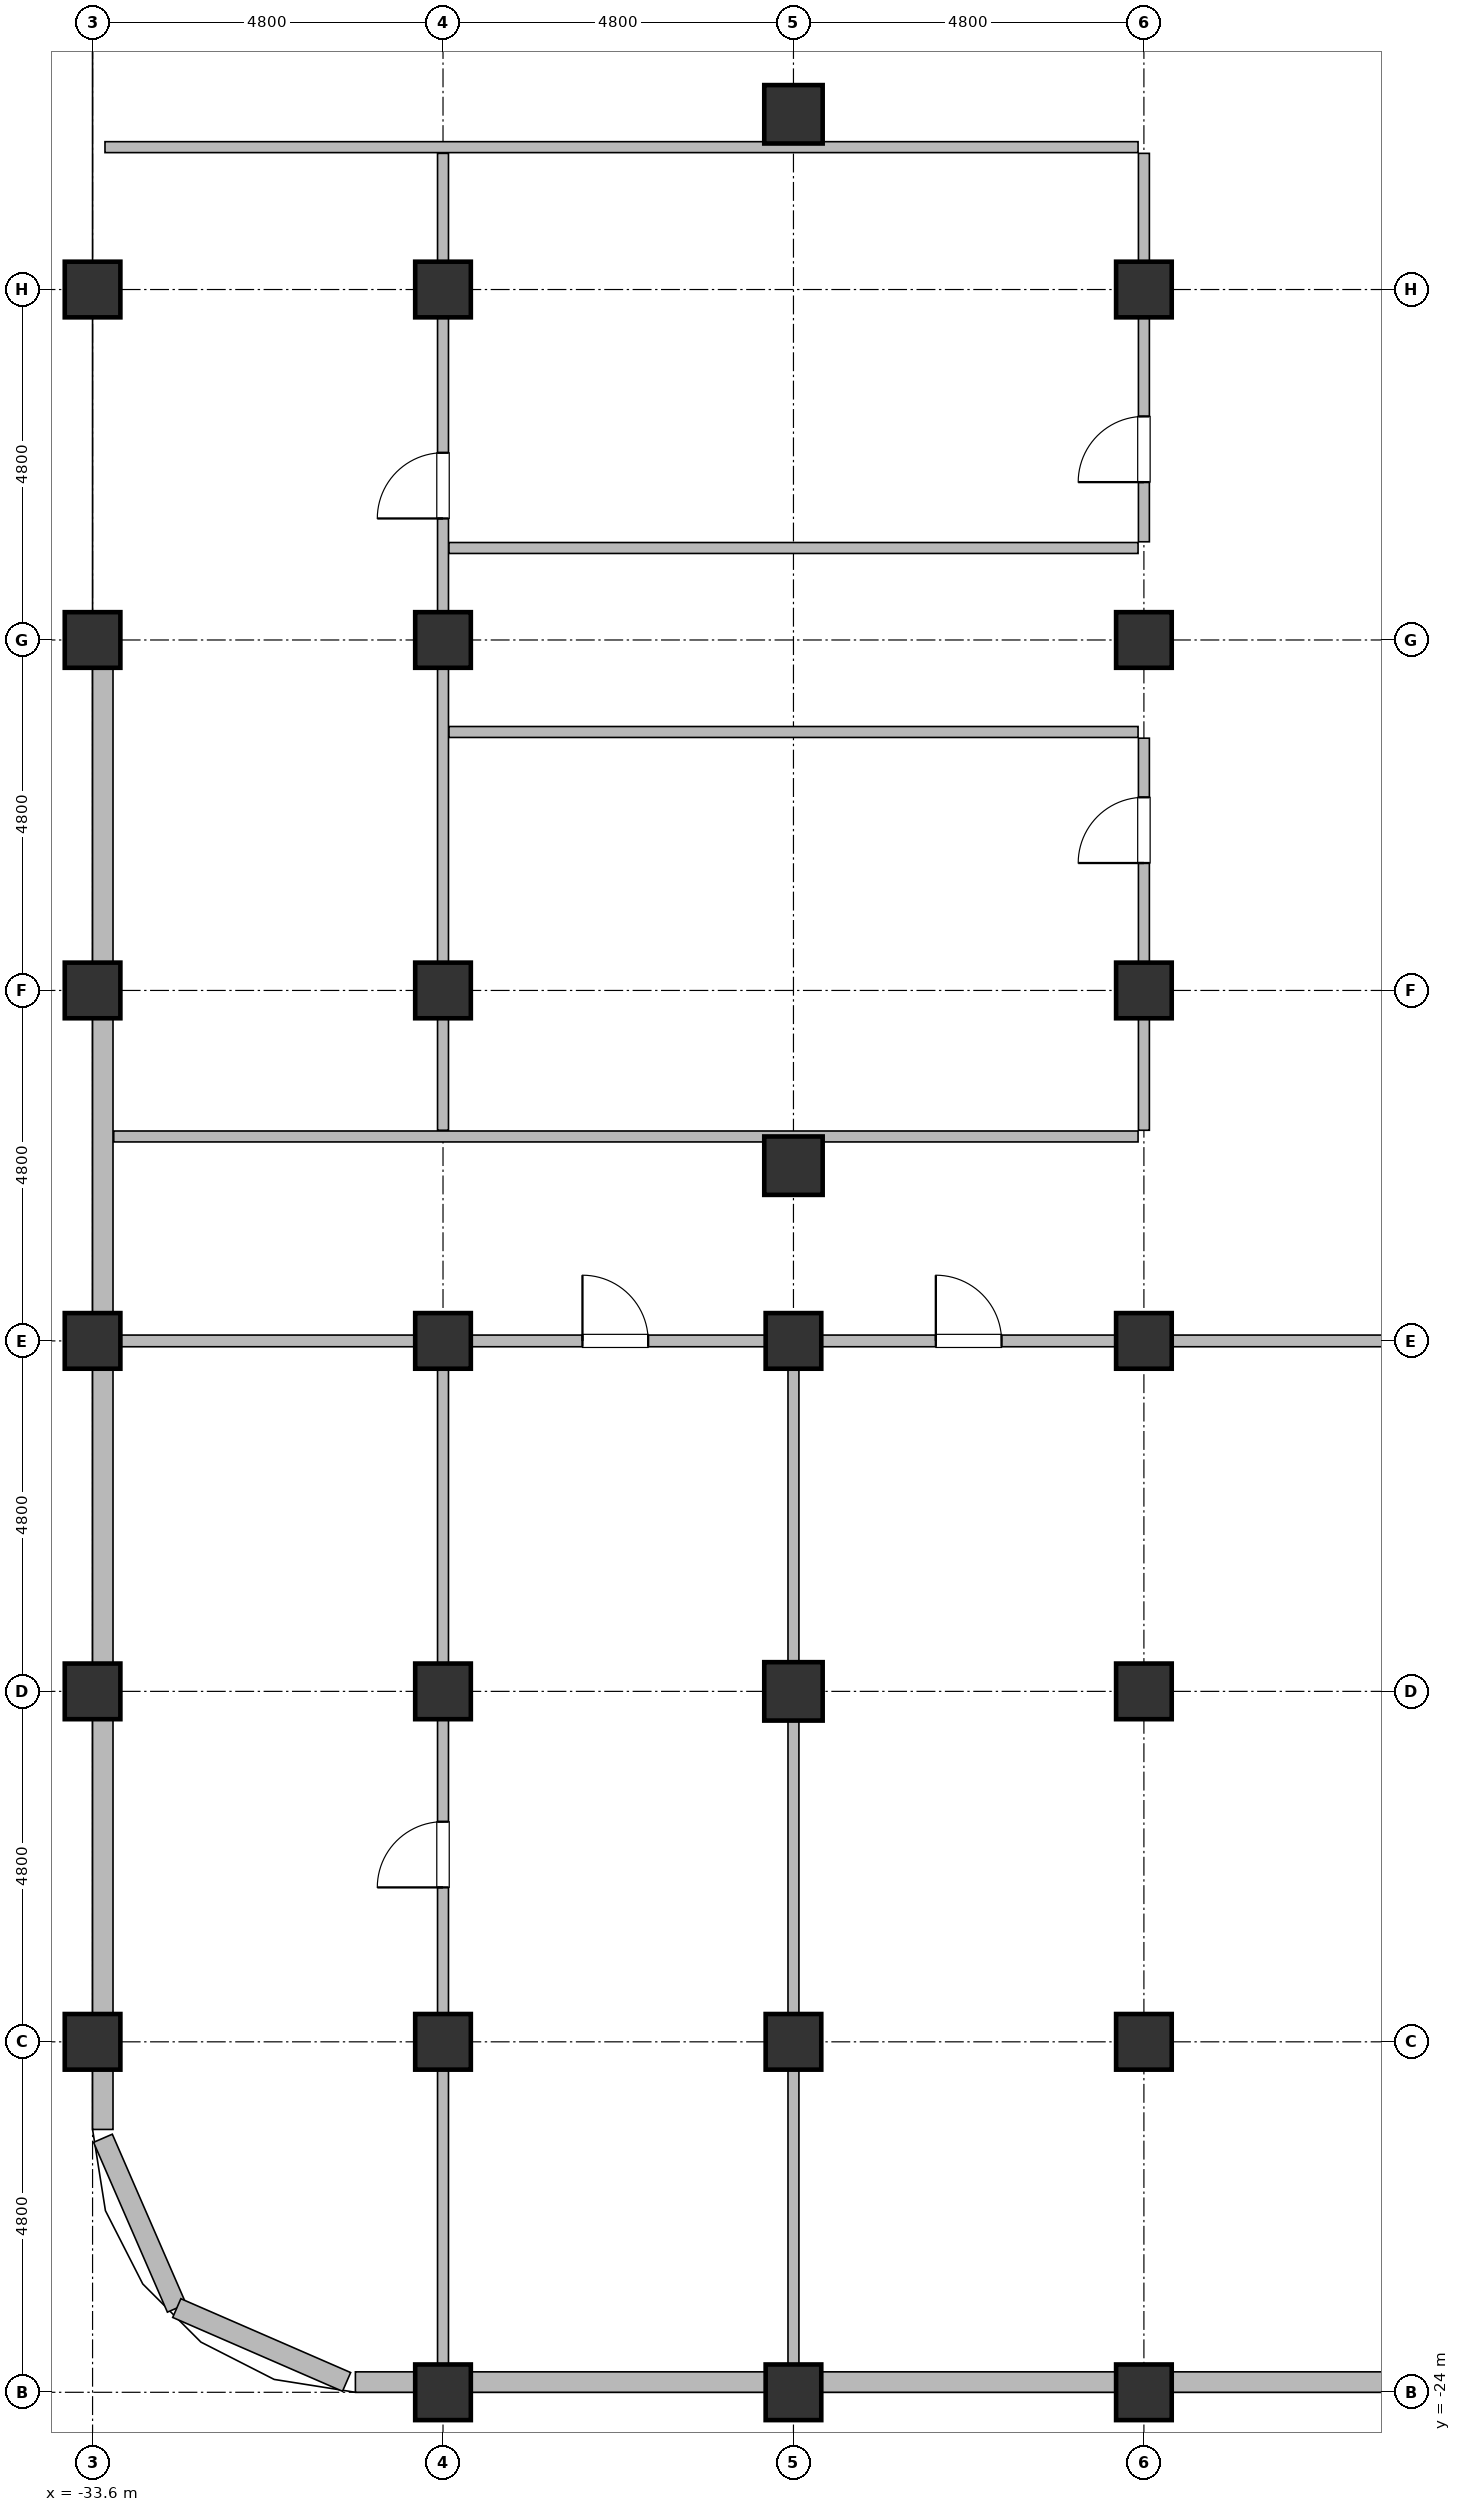
"""IFC4 building model, lengths in metres.
Left out: names, types, materials, properties, quantities, classifications, styles, units other than length and angle.
Written with IfcOpenShell. Run it as: python <this file> out.ifc"""

import sys

from ifc_helpers import new_model, si_unit, direction, frame, frame_2d, origin, origin_2d, place, context, subcontext, project, spatial, rectangle, hollow_rectangle, hollow_circle, extrude, element, fill, save


model = new_model("IFC4")
c1 = context("Model", 3, precision=1e-05, world=origin(), true_north=direction((0.0, 1.0)))
c2 = subcontext(c1, "Body", "Model", "MODEL_VIEW")
j1 = project(units=[si_unit("LENGTHUNIT", "METRE"), si_unit("PLANEANGLEUNIT", "RADIAN")], contexts=[c1])
p1 = place(None, origin())
s1 = spatial("IfcSite", under=j1, at=p1, CompositionType="ELEMENT")
p2 = place(p1, origin())
s2 = spatial("IfcBuilding", under=s1, at=p2, CompositionType="ELEMENT")
p3 = place(p2, frame((0.0, 0.0, 48.5)))
s3 = spatial("IfcBuildingStorey", under=s2, at=p3, CompositionType="ELEMENT", Elevation=48.5)
for number, where, z_axis, x_axis in (
    (1, (-33.6, -19.2, 0.0), (0.0, 0.0, 1.0), (1.0, 0.0, 0.0)),
    (2, (-33.6, -14.4, 0.0), (0.0, 0.0, 1.0), (1.0, 0.0, 0.0)),
    (3, (-33.6, -9.6, 0.0), (0.0, 0.0, 1.0), (1.0, 0.0, 0.0)),
    (4, (-33.6, -4.8, 0.0), (0.0, 0.0, 1.0), (1.0, 0.0, 0.0)),
    (5, (-33.6, 0.0, 0.0), (0.0, 0.0, 1.0), (1.0, 0.0, 0.0)),
    (6, (-33.6, 4.8, 0.0), (0.0, 0.0, 1.0), (1.0, 0.0, 0.0)),
    (7, (-28.8, -24.0, 0.0), (0.0, 0.0, 1.0), (1.0, 0.0, 0.0)),
    (8, (-28.8, -19.2, 0.0), (0.0, 0.0, 1.0), (1.0, 0.0, 0.0)),
    (9, (-28.8, -14.4, 0.0), (0.0, 0.0, 1.0), (1.0, 0.0, 0.0)),
    (10, (-28.8, -9.6, 0.0), (0.0, 0.0, 1.0), (1.0, 0.0, 0.0)),
    (11, (-28.8, -4.8, 0.0), (0.0, 0.0, 1.0), (1.0, 0.0, 0.0)),
    (12, (-28.8, 0.0, 0.0), (0.0, 0.0, 1.0), (1.0, 0.0, 0.0)),
    (13, (-28.8, 4.8, 0.0), (0.0, 0.0, 1.0), (1.0, 0.0, 0.0)),
    (14, (-24.0, -24.0, 0.0), (0.0, 0.0, 1.0), (1.0, 0.0, 0.0)),
    (15, (-24.0, -19.2, 0.0), (0.0, 0.0, 1.0), (1.0, 0.0, 0.0)),
):
    element("IfcColumn", number, at=place(p3, frame(where, z_axis=z_axis, x_axis=x_axis)), inside=s3, PredefinedType="COLUMN", context=c2, shape_type="SweptSolid", body=[
        extrude(hollow_circle(Radius=0.381, WallThickness=0.032, at=origin_2d()), origin(), (0.0, 0.0, 1.0), 3.7),
    ])
p4 = place(p3, frame((-24.0, -14.4, 0.0), z_axis=(0.0, 0.0, 1.0), x_axis=(1.0, 0.0, 0.0)))
e16 = element("IfcColumn", 16, at=p4, inside=s3, PredefinedType="COLUMN", context=c2, shape_type="SweptSolid", body=[
    extrude(hollow_rectangle(XDim=0.8, YDim=0.8, WallThickness=0.036, at=origin_2d()), origin(), (0.0, 0.0, 1.0), 3.7),
])
p5 = place(p3, frame((-24.0, -9.6, 0.0), z_axis=(0.0, 0.0, 1.0), x_axis=(1.0, 0.0, 0.0)))
e17 = element("IfcColumn", 17, at=p5, inside=s3, PredefinedType="COLUMN", context=c2, shape_type="SweptSolid", body=[
    extrude(hollow_circle(Radius=0.381, WallThickness=0.032, at=origin_2d()), origin(), (0.0, 0.0, 1.0), 3.7),
])
for number, where, z_axis, x_axis in (
    (18, (-24.0, -7.2, 0.0), (0.0, 0.0, 1.0), (1.0, 0.0, 0.0)),
    (19, (-24.0, 7.2, 0.0), (0.0, 0.0, 1.0), (1.0, 0.0, 0.0)),
):
    element("IfcColumn", number, at=place(p3, frame(where, z_axis=z_axis, x_axis=x_axis)), inside=s3, PredefinedType="COLUMN", context=c2, shape_type="SweptSolid", body=[
        extrude(hollow_rectangle(XDim=0.8, YDim=0.8, WallThickness=0.036, at=origin_2d()), origin(), (0.0, 0.0, 1.0), 3.7),
    ])
for number, where, z_axis, x_axis in (
    (20, (-19.2, -24.0, 0.0), (0.0, 0.0, 1.0), (1.0, 0.0, 0.0)),
    (21, (-19.2, -19.2, 0.0), (0.0, 0.0, 1.0), (1.0, 0.0, 0.0)),
    (22, (-19.2, -14.4, 0.0), (0.0, 0.0, 1.0), (1.0, 0.0, 0.0)),
    (23, (-19.2, -9.6, 0.0), (0.0, 0.0, 1.0), (1.0, 0.0, 0.0)),
    (24, (-19.2, -4.8, 0.0), (0.0, 0.0, 1.0), (1.0, 0.0, 0.0)),
    (25, (-19.2, 0.0, 0.0), (0.0, 0.0, 1.0), (1.0, 0.0, 0.0)),
    (26, (-19.2, 4.8, 0.0), (0.0, 0.0, 1.0), (1.0, 0.0, 0.0)),
):
    element("IfcColumn", number, at=place(p3, frame(where, z_axis=z_axis, x_axis=x_axis)), inside=s3, PredefinedType="COLUMN", context=c2, shape_type="SweptSolid", body=[
        extrude(hollow_circle(Radius=0.381, WallThickness=0.032, at=origin_2d()), origin(), (0.0, 0.0, 1.0), 3.7),
    ])
p6 = place(p3, frame((-33.458, -20.521, 0.0), z_axis=(0.0, 0.0, 1.0), x_axis=(0.398792985289, -0.917040977756, 0.0)))
e27 = element("IfcWall", 27, at=p6, inside=s3, PredefinedType="SOLIDWALL", context=c2, shape_type="SweptSolid", body=[
    extrude(rectangle(XDim=2.536, YDim=0.28, at=frame_2d((1.268, 0.0))), origin(), (0.0, 0.0, 1.0), 2.12),
])
p7 = place(p3, frame((-32.447, -22.847, 0.0), z_axis=(0.0, 0.0, 1.0), x_axis=(0.917060872934, -0.398747232384, 0.0)))
e28 = element("IfcWall", 28, at=p7, inside=s3, PredefinedType="SOLIDWALL", context=c2, shape_type="SweptSolid", body=[
    extrude(rectangle(XDim=2.536, YDim=0.28, at=frame_2d((1.268, 0.0))), origin(), (0.0, 0.0, 1.0), 2.12),
])
p8 = place(p3, frame((-30.0, -23.86, 0.0), z_axis=(0.0, 0.0, 1.0), x_axis=(1.0, 0.0, 0.0)))
e29 = element("IfcWall", 29, at=p8, inside=s3, PredefinedType="SOLIDWALL", context=c2, shape_type="SweptSolid", body=[
    extrude(rectangle(XDim=25.25, YDim=0.28, at=frame_2d((12.625, 0.0))), origin(), (0.0, 0.0, 1.0), 2.12),
])
p9 = place(p8, frame((11.798, 0.0, 0.75)))
e30 = element("IfcOpeningElement", 30, at=p9, cuts=e29, PredefinedType="OPENING", context=c2, shape_type="SweptSolid", body=[
    extrude(rectangle(XDim=1.8, YDim=1.15, at=frame_2d((0.9, 0.575))), frame((0.0, 0.155, 0.0), z_axis=(0.0, -1.0, 0.0), x_axis=(1.0, 0.0, 0.0)), (0.0, 0.0, 1.0), 0.31),
])
p10 = place(p3, frame((-33.46, -20.4, 0.0), z_axis=(0.0, 0.0, 1.0), x_axis=(0.0, 1.0, 0.0)))
e31 = element("IfcWall", 31, at=p10, inside=s3, PredefinedType="SOLIDWALL", context=c2, shape_type="SweptSolid", body=[
    extrude(rectangle(XDim=20.38, YDim=0.28, at=frame_2d((10.19, 0.0))), origin(), (0.0, 0.0, 1.0), 2.12),
])
p11 = place(p3, frame((-33.31, -9.6, 0.0), z_axis=(0.0, 0.0, 1.0), x_axis=(1.0, 0.0, 0.0)))
e32 = element("IfcWall", 32, at=p11, inside=s3, PredefinedType="PARTITIONING", context=c2, shape_type="SweptSolid", body=[
    extrude(rectangle(XDim=61.82, YDim=0.16, at=frame_2d((30.91, 0.0))), origin(), (0.0, 0.0, 1.0), 2.62),
])
p12 = place(p11, frame((6.42, 0.0, 0.0)))
e33 = element("IfcOpeningElement", 33, at=p12, cuts=e32, PredefinedType="OPENING", context=c2, shape_type="SweptSolid", body=[
    extrude(rectangle(XDim=0.9, YDim=2.1, at=frame_2d((0.45, 1.05))), frame((0.0, 0.095, 0.0), z_axis=(0.0, -1.0, 0.0), x_axis=(1.0, 0.0, 0.0)), (0.0, 0.0, 1.0), 0.19),
])
p13 = place(p11, frame((54.5, 0.0, 0.0)))
e34 = element("IfcOpeningElement", 34, at=p13, cuts=e32, PredefinedType="OPENING", context=c2, shape_type="SweptSolid", body=[
    extrude(rectangle(XDim=0.9, YDim=2.1, at=frame_2d((0.45, 1.05))), frame((0.0, 0.095, 0.0), z_axis=(0.0, -1.0, 0.0), x_axis=(1.0, 0.0, 0.0)), (0.0, 0.0, 1.0), 0.19),
])
p14 = place(p11, frame((11.26, 0.0, 0.0)))
e35 = element("IfcOpeningElement", 35, at=p14, cuts=e32, PredefinedType="OPENING", context=c2, shape_type="SweptSolid", body=[
    extrude(rectangle(XDim=0.9, YDim=2.1, at=frame_2d((0.45, 1.05))), frame((0.0, 0.095, 0.0), z_axis=(0.0, -1.0, 0.0), x_axis=(1.0, 0.0, 0.0)), (0.0, 0.0, 1.0), 0.19),
])
p15 = place(p11, frame((30.425, 0.0, 0.0)))
e36 = element("IfcOpeningElement", 36, at=p15, cuts=e32, PredefinedType="OPENING", context=c2, shape_type="SweptSolid", body=[
    extrude(rectangle(XDim=1.05, YDim=2.2, at=frame_2d((0.525, 1.1))), frame((0.0, 0.095, 0.0), z_axis=(0.0, -1.0, 0.0), x_axis=(1.0, 0.0, 0.0)), (0.0, 0.0, 1.0), 0.19),
])
p16 = place(p11, frame((40.62, 0.0, 0.0)))
e37 = element("IfcOpeningElement", 37, at=p16, cuts=e32, PredefinedType="OPENING", context=c2, shape_type="SweptSolid", body=[
    extrude(rectangle(XDim=0.92, YDim=2.15, at=frame_2d((0.46, 1.075))), frame((0.0, 0.095, 0.0), z_axis=(0.0, -1.0, 0.0), x_axis=(1.0, 0.0, 0.0)), (0.0, 0.0, 1.0), 0.19),
])
p17 = place(p11, frame((44.28, 0.0, 0.0)))
e38 = element("IfcOpeningElement", 38, at=p17, cuts=e32, PredefinedType="OPENING", context=c2, shape_type="SweptSolid", body=[
    extrude(rectangle(XDim=0.92, YDim=2.15, at=frame_2d((0.46, 1.075))), frame((0.0, 0.095, 0.0), z_axis=(0.0, -1.0, 0.0), x_axis=(1.0, 0.0, 0.0)), (0.0, 0.0, 1.0), 0.19),
])
p18 = place(p11, frame((50.22, 0.0, 0.0)))
e39 = element("IfcOpeningElement", 39, at=p18, cuts=e32, PredefinedType="OPENING", context=c2, shape_type="SweptSolid", body=[
    extrude(rectangle(XDim=0.92, YDim=2.15, at=frame_2d((0.46, 1.075))), frame((0.0, 0.095, 0.0), z_axis=(0.0, -1.0, 0.0), x_axis=(1.0, 0.0, 0.0)), (0.0, 0.0, 1.0), 0.19),
])
p19 = place(p3, frame((-33.31, -6.8, 0.0), z_axis=(0.0, 0.0, 1.0), x_axis=(1.0, 0.0, 0.0)))
e40 = element("IfcWall", 40, at=p19, inside=s3, PredefinedType="PARTITIONING", context=c2, shape_type="SweptSolid", body=[
    extrude(rectangle(XDim=14.03, YDim=0.15, at=frame_2d((7.015, 0.0))), origin(), (0.0, 0.0, 1.0), 2.62),
])
for number, where, z_axis, x_axis in (
    (41, (-28.72, -1.26, 0.0), (0.0, 0.0, 1.0), (1.0, 0.0, 0.0)),
    (42, (-28.72, 1.26, 0.0), (0.0, 0.0, 1.0), (1.0, 0.0, 0.0)),
):
    element("IfcWall", number, at=place(p3, frame(where, z_axis=z_axis, x_axis=x_axis)), inside=s3, PredefinedType="PARTITIONING", context=c2, shape_type="SweptSolid", body=[
        extrude(rectangle(XDim=9.44, YDim=0.15, at=frame_2d((4.72, 0.0))), origin(), (0.0, 0.0, 1.0), 2.82),
    ])
p20 = place(p3, frame((-33.43, 6.75, 0.0), z_axis=(0.0, 0.0, 1.0), x_axis=(1.0, 0.0, 0.0)))
e43 = element("IfcWall", 43, at=p20, inside=s3, PredefinedType="PARTITIONING", context=c2, shape_type="SweptSolid", body=[
    extrude(rectangle(XDim=14.15, YDim=0.15, at=frame_2d((7.075, 0.0))), origin(), (0.0, 0.0, 1.0), 2.62),
])
p21 = place(p3, frame((-28.8, -23.71, 0.0), z_axis=(0.0, 0.0, 1.0), x_axis=(0.0, 1.0, 0.0)))
e44 = element("IfcWall", 44, at=p21, inside=s3, PredefinedType="PARTITIONING", context=c2, shape_type="SweptSolid", body=[
    extrude(rectangle(XDim=13.99, YDim=0.15, at=frame_2d((6.995, 0.0))), origin(), (0.0, 0.0, 1.0), 2.12),
])
p22 = place(p21, frame((6.625, 0.0, 0.0)))
e45 = element("IfcOpeningElement", 45, at=p22, cuts=e44, PredefinedType="OPENING", context=c2, shape_type="SweptSolid", body=[
    extrude(rectangle(XDim=0.9, YDim=2.02, at=frame_2d((0.45, 1.01))), frame((0.0, 0.09, 0.0), z_axis=(0.0, -1.0, 0.0), x_axis=(1.0, 0.0, 0.0)), (0.0, 0.0, 1.0), 0.18),
])
p23 = place(p3, frame((-28.8, -6.715, 0.0), z_axis=(0.0, 0.0, 1.0), x_axis=(0.0, 1.0, 0.0)))
e46 = element("IfcWall", 46, at=p23, inside=s3, PredefinedType="PARTITIONING", context=c2, shape_type="SweptSolid", body=[
    extrude(rectangle(XDim=13.38, YDim=0.15, at=frame_2d((6.69, 0.0))), origin(), (0.0, 0.0, 1.0), 2.82),
])
p24 = place(p23, frame((8.379, 0.0, 0.0)))
e47 = element("IfcOpeningElement", 47, at=p24, cuts=e46, PredefinedType="OPENING", context=c2, shape_type="SweptSolid", body=[
    extrude(rectangle(XDim=0.9, YDim=2.1, at=frame_2d((0.45, 1.05))), frame((0.0, 0.09, 0.0), z_axis=(0.0, -1.0, 0.0), x_axis=(1.0, 0.0, 0.0)), (0.0, 0.0, 1.0), 0.18),
])
p25 = place(p3, frame((-24.0, -23.71, 0.0), z_axis=(0.0, 0.0, 1.0), x_axis=(0.0, 1.0, 0.0)))
e48 = element("IfcWall", 48, at=p25, inside=s3, PredefinedType="PARTITIONING", context=c2, shape_type="SweptSolid", body=[
    extrude(rectangle(XDim=13.99, YDim=0.15, at=frame_2d((6.995, 0.0))), origin(), (0.0, 0.0, 1.0), 2.62),
])
p26 = place(p3, frame((-19.2, -6.715, 0.0), z_axis=(0.0, 0.0, 1.0), x_axis=(0.0, 1.0, 0.0)))
e49 = element("IfcWall", 49, at=p26, inside=s3, PredefinedType="PARTITIONING", context=c2, shape_type="SweptSolid", body=[
    extrude(rectangle(XDim=5.37, YDim=0.15, at=frame_2d((2.685, 0.0))), origin(), (0.0, 0.0, 1.0), 2.62),
])
p27 = place(p26, frame((3.66, 0.0, 0.0)))
e50 = element("IfcOpeningElement", 50, at=p27, cuts=e49, PredefinedType="OPENING", context=c2, shape_type="SweptSolid", body=[
    extrude(rectangle(XDim=0.9, YDim=2.1, at=frame_2d((0.45, 1.05))), frame((0.0, 0.09, 0.0), z_axis=(0.0, -1.0, 0.0), x_axis=(1.0, 0.0, 0.0)), (0.0, 0.0, 1.0), 0.18),
])
p28 = place(p3, frame((-19.2, 1.345, 0.0), z_axis=(0.0, 0.0, 1.0), x_axis=(0.0, 1.0, 0.0)))
e51 = element("IfcWall", 51, at=p28, inside=s3, PredefinedType="PARTITIONING", context=c2, shape_type="SweptSolid", body=[
    extrude(rectangle(XDim=5.32, YDim=0.15, at=frame_2d((2.66, 0.0))), origin(), (0.0, 0.0, 1.0), 2.82),
])
p29 = place(p28, frame((0.817, 0.0, 0.0)))
e52 = element("IfcOpeningElement", 52, at=p29, cuts=e51, PredefinedType="OPENING", context=c2, shape_type="SweptSolid", body=[
    extrude(rectangle(XDim=0.9, YDim=2.1, at=frame_2d((0.45, 1.05))), frame((0.0, 0.09, 0.0), z_axis=(0.0, -1.0, 0.0), x_axis=(1.0, 0.0, 0.0)), (0.0, 0.0, 1.0), 0.18),
])
p30 = place(p9, origin())
e53 = element("IfcWindow", 53, at=p30, inside=s3, PartitioningType="SINGLE_PANEL", PredefinedType="WINDOW", context=c2, shape_type="SweptSolid", body=[
    extrude(rectangle(XDim=1.8, YDim=1.15, at=frame_2d((0.9, 0.575))), frame((0.0, 0.03, 0.0), z_axis=(0.0, -1.0, 0.0), x_axis=(1.0, 0.0, 0.0)), (0.0, 0.0, 1.0), 0.06),
])
fill(e30, e53)
p31 = place(p22, origin())
e54 = element("IfcDoor", 54, at=p31, inside=s3, OperationType="SINGLE_SWING_RIGHT", PredefinedType="DOOR", context=c2, shape_type="SweptSolid", body=[
    extrude(rectangle(XDim=0.9, YDim=2.02, at=frame_2d((0.45, 1.01))), frame((0.0, 0.025, 0.0), z_axis=(0.0, -1.0, 0.0), x_axis=(1.0, 0.0, 0.0)), (0.0, 0.0, 1.0), 0.05),
])
fill(e45, e54)
p32 = place(p12, origin())
e55 = element("IfcDoor", 55, at=p32, inside=s3, OperationType="SINGLE_SWING_RIGHT", PredefinedType="DOOR", context=c2, shape_type="SweptSolid", body=[
    extrude(rectangle(XDim=0.9, YDim=2.1, at=frame_2d((0.45, 1.05))), frame((0.0, 0.025, 0.0), z_axis=(0.0, -1.0, 0.0), x_axis=(1.0, 0.0, 0.0)), (0.0, 0.0, 1.0), 0.05),
])
fill(e33, e55)
p33 = place(p27, origin())
e56 = element("IfcDoor", 56, at=p33, inside=s3, OperationType="SINGLE_SWING_RIGHT", PredefinedType="DOOR", context=c2, shape_type="SweptSolid", body=[
    extrude(rectangle(XDim=0.9, YDim=2.1, at=frame_2d((0.45, 1.05))), frame((0.0, 0.025, 0.0), z_axis=(0.0, -1.0, 0.0), x_axis=(1.0, 0.0, 0.0)), (0.0, 0.0, 1.0), 0.05),
])
fill(e50, e56)
p34 = place(p29, origin())
e57 = element("IfcDoor", 57, at=p34, inside=s3, OperationType="SINGLE_SWING_LEFT", PredefinedType="DOOR", context=c2, shape_type="SweptSolid", body=[
    extrude(rectangle(XDim=0.9, YDim=2.1, at=frame_2d((0.45, 1.05))), frame((0.0, 0.025, 0.0), z_axis=(0.0, -1.0, 0.0), x_axis=(1.0, 0.0, 0.0)), (0.0, 0.0, 1.0), 0.05),
])
fill(e52, e57)
p35 = place(p24, origin())
e58 = element("IfcDoor", 58, at=p35, inside=s3, OperationType="SINGLE_SWING_RIGHT", PredefinedType="DOOR", context=c2, shape_type="SweptSolid", body=[
    extrude(rectangle(XDim=0.9, YDim=2.1, at=frame_2d((0.45, 1.05))), frame((0.0, 0.025, 0.0), z_axis=(0.0, -1.0, 0.0), x_axis=(1.0, 0.0, 0.0)), (0.0, 0.0, 1.0), 0.05),
])
fill(e47, e58)
p36 = place(p14, origin())
e59 = element("IfcDoor", 59, at=p36, inside=s3, OperationType="SINGLE_SWING_LEFT", PredefinedType="DOOR", context=c2, shape_type="SweptSolid", body=[
    extrude(rectangle(XDim=0.9, YDim=2.1, at=frame_2d((0.45, 1.05))), frame((0.0, 0.025, 0.0), z_axis=(0.0, -1.0, 0.0), x_axis=(1.0, 0.0, 0.0)), (0.0, 0.0, 1.0), 0.05),
])
fill(e35, e59)
save(model, sys.argv[1])
